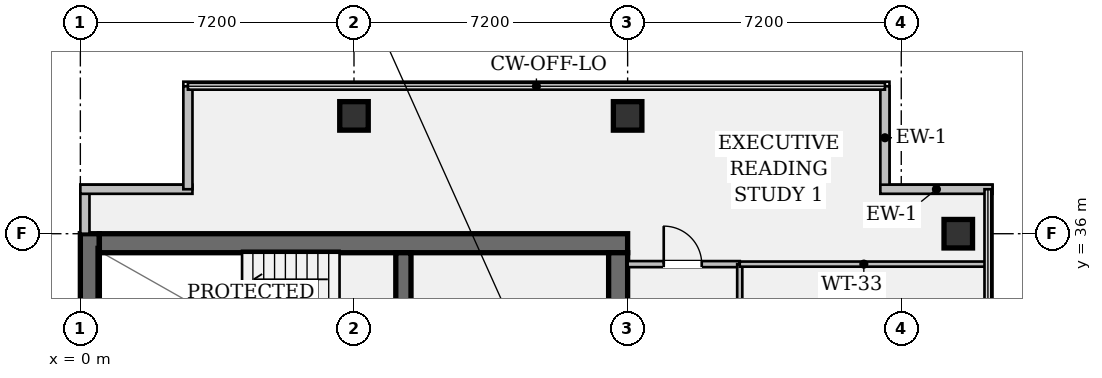
"""IFC4 building model, lengths in metres.
Left out: names, types, materials, properties, quantities, classifications, styles, units other than length and angle.
Written with IfcOpenShell. Run it as: python <this file> out.ifc"""

import sys

from ifc_helpers import new_model, si_unit, direction, frame, frame_2d, origin, origin_2d, place, context, subcontext, project, spatial, rectangle, hollow_rectangle, extrude, element, fill, save


model = new_model("IFC4")
c1 = context("Model", 3, precision=1e-05, world=origin(), true_north=direction((0.0, 1.0)))
c2 = subcontext(c1, "Body", "Model", "MODEL_VIEW")
j1 = project(units=[si_unit("LENGTHUNIT", "METRE"), si_unit("PLANEANGLEUNIT", "RADIAN")], contexts=[c1])
p1 = place(None, origin())
s1 = spatial("IfcSite", under=j1, at=p1, CompositionType="ELEMENT")
p2 = place(p1, origin())
s2 = spatial("IfcBuilding", under=s1, at=p2, CompositionType="ELEMENT")
p3 = place(p2, frame((0.0, 0.0, 229.25)))
s3 = spatial("IfcBuildingStorey", under=s2, at=p3, CompositionType="ELEMENT", Elevation=229.25)
p4 = place(p3, frame((0.25, 7.2, 0.0), z_axis=(0.0, 0.0, 1.0), x_axis=(0.0, 1.0, 0.0)))
e1 = element("IfcWall", 1, at=p4, inside=s3, PredefinedType="SHEAR", context=c2, shape_type="SweptSolid", body=[
    extrude(rectangle(XDim=28.8, YDim=0.5, at=frame_2d((14.4, 0.0))), origin(), (0.0, 0.0, 1.0), 3.24),
])
p5 = place(p3, frame((0.5, 35.75, 0.0), z_axis=(0.0, 0.0, 1.0), x_axis=(1.0, 0.0, 0.0)))
e2 = element("IfcWall", 2, at=p5, inside=s3, PredefinedType="SHEAR", context=c2, shape_type="SweptSolid", body=[
    extrude(rectangle(XDim=13.9, YDim=0.5, at=frame_2d((6.95, 0.0))), origin(), (0.0, 0.0, 1.0), 3.24),
])
p6 = place(p3, frame((14.15, 35.5, 0.0), z_axis=(0.0, 0.0, 1.0), x_axis=(0.0, -1.0, 0.0)))
e3 = element("IfcWall", 3, at=p6, inside=s3, PredefinedType="SHEAR", context=c2, shape_type="SweptSolid", body=[
    extrude(rectangle(XDim=27.8, YDim=0.5, at=frame_2d((13.9, 0.0))), origin(), (0.0, 0.0, 1.0), 3.24),
])
p7 = place(p6, frame((1.4, 0.0, 0.0)))
e4 = element("IfcOpeningElement", 4, at=p7, cuts=e3, PredefinedType="OPENING", context=c2, shape_type="SweptSolid", body=[
    extrude(rectangle(XDim=1.2, YDim=2.15, at=frame_2d((0.6, 1.075))), frame((0.0, 0.262, 0.0), z_axis=(0.0, -1.0, 0.0), x_axis=(1.0, 0.0, 0.0)), (0.0, 0.0, 1.0), 0.524),
])
p8 = place(p6, frame((25.35, 0.0, 0.0)))
e5 = element("IfcOpeningElement", 5, at=p8, cuts=e3, PredefinedType="OPENING", context=c2, shape_type="SweptSolid", body=[
    extrude(rectangle(XDim=1.2, YDim=2.15, at=frame_2d((0.6, 1.075))), frame((0.0, 0.262, 0.0), z_axis=(0.0, -1.0, 0.0), x_axis=(1.0, 0.0, 0.0)), (0.0, 0.0, 1.0), 0.524),
])
p9 = place(p6, frame((14.7, 0.0, 0.0)))
e6 = element("IfcOpeningElement", 6, at=p9, cuts=e3, PredefinedType="OPENING", context=c2, shape_type="SweptSolid", body=[
    extrude(rectangle(XDim=1.6, YDim=2.2, at=frame_2d((0.8, 1.1))), frame((0.0, 0.262, 0.0), z_axis=(0.0, -1.0, 0.0), x_axis=(1.0, 0.0, 0.0)), (0.0, 0.0, 1.0), 0.524),
])
p10 = place(p3, frame((8.5, 31.72, 0.0), z_axis=(0.0, 0.0, 1.0), x_axis=(0.0, 1.0, 0.0)))
e7 = element("IfcWall", 7, at=p10, inside=s3, PredefinedType="SHEAR", context=c2, shape_type="SweptSolid", body=[
    extrude(rectangle(XDim=3.78, YDim=0.4, at=frame_2d((1.89, 0.0))), origin(), (0.0, 0.0, 1.0), 3.24),
])
p11 = place(p10, frame((0.9, 0.0, 0.0)))
e8 = element("IfcOpeningElement", 8, at=p11, cuts=e7, PredefinedType="OPENING", context=c2, shape_type="SweptSolid", body=[
    extrude(rectangle(XDim=1.1, YDim=2.15, at=frame_2d((0.55, 1.075))), frame((0.0, 0.212, 0.0), z_axis=(0.0, -1.0, 0.0), x_axis=(1.0, 0.0, 0.0)), (0.0, 0.0, 1.0), 0.424),
])
for number, where, z_axis, x_axis in (
    (9, (7.2, 39.1, 0.0), (0.0, 0.0, 1.0), (1.0, 0.0, 0.0)),
    (10, (14.4, 39.1, 0.0), (0.0, 0.0, 1.0), (1.0, 0.0, 0.0)),
    (11, (23.1, 36.0, 0.0), (0.0, 0.0, 1.0), (1.0, 0.0, 0.0)),
):
    element("IfcColumn", number, at=place(p3, frame(where, z_axis=z_axis, x_axis=x_axis)), inside=s3, PredefinedType="COLUMN", context=c2, shape_type="SweptSolid", body=[
        extrude(hollow_rectangle(XDim=0.75, YDim=0.75, WallThickness=0.045, at=origin_2d()), origin(), (0.0, 0.0, 1.0), 3.24),
    ])
p12 = place(p3, frame((0.12, 36.0, 0.0), z_axis=(0.0, 0.0, 1.0), x_axis=(0.0, 1.0, 0.0)))
e12 = element("IfcWall", 12, at=p12, inside=s3, PredefinedType="STANDARD", context=c2, shape_type="SweptSolid", body=[
    extrude(rectangle(XDim=1.17, YDim=0.24, at=frame_2d((0.585, 0.0))), origin(), (0.0, 0.0, 1.0), 3.24),
])
p13 = place(p3, frame((0.0, 37.17, 0.0), z_axis=(0.0, 0.0, 1.0), x_axis=(1.0, 0.0, 0.0)))
e13 = element("IfcWall", 13, at=p13, inside=s3, PredefinedType="STANDARD", context=c2, shape_type="SweptSolid", body=[
    extrude(rectangle(XDim=2.95, YDim=0.24, at=frame_2d((1.475, 0.0))), origin(), (0.0, 0.0, 1.0), 3.24),
])
for number, where, z_axis, x_axis in (
    (14, (2.83, 37.17, 0.0), (0.0, 0.0, 1.0), (0.0, 1.0, 0.0)),
    (15, (21.17, 39.88, 0.0), (0.0, 0.0, 1.0), (0.0, -1.0, 0.0)),
):
    element("IfcWall", number, at=place(p3, frame(where, z_axis=z_axis, x_axis=x_axis)), inside=s3, PredefinedType="STANDARD", context=c2, shape_type="SweptSolid", body=[
        extrude(rectangle(XDim=2.71, YDim=0.24, at=frame_2d((1.355, 0.0))), origin(), (0.0, 0.0, 1.0), 3.24),
    ])
p14 = place(p3, frame((21.05, 37.17, 0.0), z_axis=(0.0, 0.0, 1.0), x_axis=(1.0, 0.0, 0.0)))
e16 = element("IfcWall", 16, at=p14, inside=s3, PredefinedType="STANDARD", context=c2, shape_type="SweptSolid", body=[
    extrude(rectangle(XDim=2.95, YDim=0.24, at=frame_2d((1.475, 0.0))), origin(), (0.0, 0.0, 1.0), 3.24),
])
p15 = place(p3, frame((14.4, 35.2, 0.0), z_axis=(0.0, 0.0, 1.0), x_axis=(1.0, 0.0, 0.0)))
e17 = element("IfcWall", 17, at=p15, inside=s3, PredefinedType="PARTITIONING", context=c2, shape_type="SweptSolid", body=[
    extrude(rectangle(XDim=2.95, YDim=0.16, at=frame_2d((1.475, 0.0))), origin(), (0.0, 0.0, 1.0), 2.808),
])
p16 = place(p15, frame((0.95, 0.0, 0.0)))
e18 = element("IfcOpeningElement", 18, at=p16, cuts=e17, PredefinedType="OPENING", context=c2, shape_type="SweptSolid", body=[
    extrude(rectangle(XDim=1.0, YDim=2.15, at=frame_2d((0.5, 1.075))), frame((0.0, 0.092, 0.0), z_axis=(0.0, -1.0, 0.0), x_axis=(1.0, 0.0, 0.0)), (0.0, 0.0, 1.0), 0.184),
])
p17 = place(p3, frame((17.35, 12.15, 0.0), z_axis=(0.0, 0.0, 1.0), x_axis=(0.0, 1.0, 0.0)))
e19 = element("IfcWall", 19, at=p17, inside=s3, PredefinedType="PARTITIONING", context=c2, shape_type="SweptSolid", body=[
    extrude(rectangle(XDim=23.05, YDim=0.135, at=frame_2d((11.525, 0.0))), origin(), (0.0, 0.0, 1.0), 2.325),
])
p18 = place(p17, frame((4.3, 0.0, 0.0)))
e20 = element("IfcOpeningElement", 20, at=p18, cuts=e19, PredefinedType="OPENING", context=c2, shape_type="SweptSolid", body=[
    extrude(rectangle(XDim=0.92, YDim=2.15, at=frame_2d((0.46, 1.075))), frame((0.0, 0.08, 0.0), z_axis=(0.0, -1.0, 0.0), x_axis=(1.0, 0.0, 0.0)), (0.0, 0.0, 1.0), 0.159),
])
p19 = place(p17, frame((8.0, 0.0, 0.0)))
e21 = element("IfcOpeningElement", 21, at=p19, cuts=e19, PredefinedType="OPENING", context=c2, shape_type="SweptSolid", body=[
    extrude(rectangle(XDim=0.92, YDim=2.15, at=frame_2d((0.46, 1.075))), frame((0.0, 0.08, 0.0), z_axis=(0.0, -1.0, 0.0), x_axis=(1.0, 0.0, 0.0)), (0.0, 0.0, 1.0), 0.159),
])
p20 = place(p17, frame((16.32, 0.0, 0.0)))
e22 = element("IfcOpeningElement", 22, at=p20, cuts=e19, PredefinedType="OPENING", context=c2, shape_type="SweptSolid", body=[
    extrude(rectangle(XDim=0.92, YDim=2.15, at=frame_2d((0.46, 1.075))), frame((0.0, 0.08, 0.0), z_axis=(0.0, -1.0, 0.0), x_axis=(1.0, 0.0, 0.0)), (0.0, 0.0, 1.0), 0.159),
])
p21 = place(p3, frame((17.35, 35.2, 0.0), z_axis=(0.0, 0.0, 1.0), x_axis=(1.0, 0.0, 0.0)))
e23 = element("IfcWall", 23, at=p21, inside=s3, PredefinedType="PARTITIONING", context=c2, shape_type="SweptSolid", body=[
    extrude(rectangle(XDim=6.53, YDim=0.135, at=frame_2d((3.265, 0.0))), origin(), (0.0, 0.0, 1.0), 2.808),
])
p22 = place(p16, origin())
e24 = element("IfcDoor", 24, at=p22, inside=s3, OperationType="SINGLE_SWING_LEFT", PredefinedType="DOOR", context=c2, shape_type="SweptSolid", body=[
    extrude(rectangle(XDim=1.0, YDim=2.15, at=frame_2d((0.5, 1.075))), frame((0.0, 0.025, 0.0), z_axis=(0.0, -1.0, 0.0), x_axis=(1.0, 0.0, 0.0)), (0.0, 0.0, 1.0), 0.05),
])
fill(e18, e24)
save(model, sys.argv[1])
